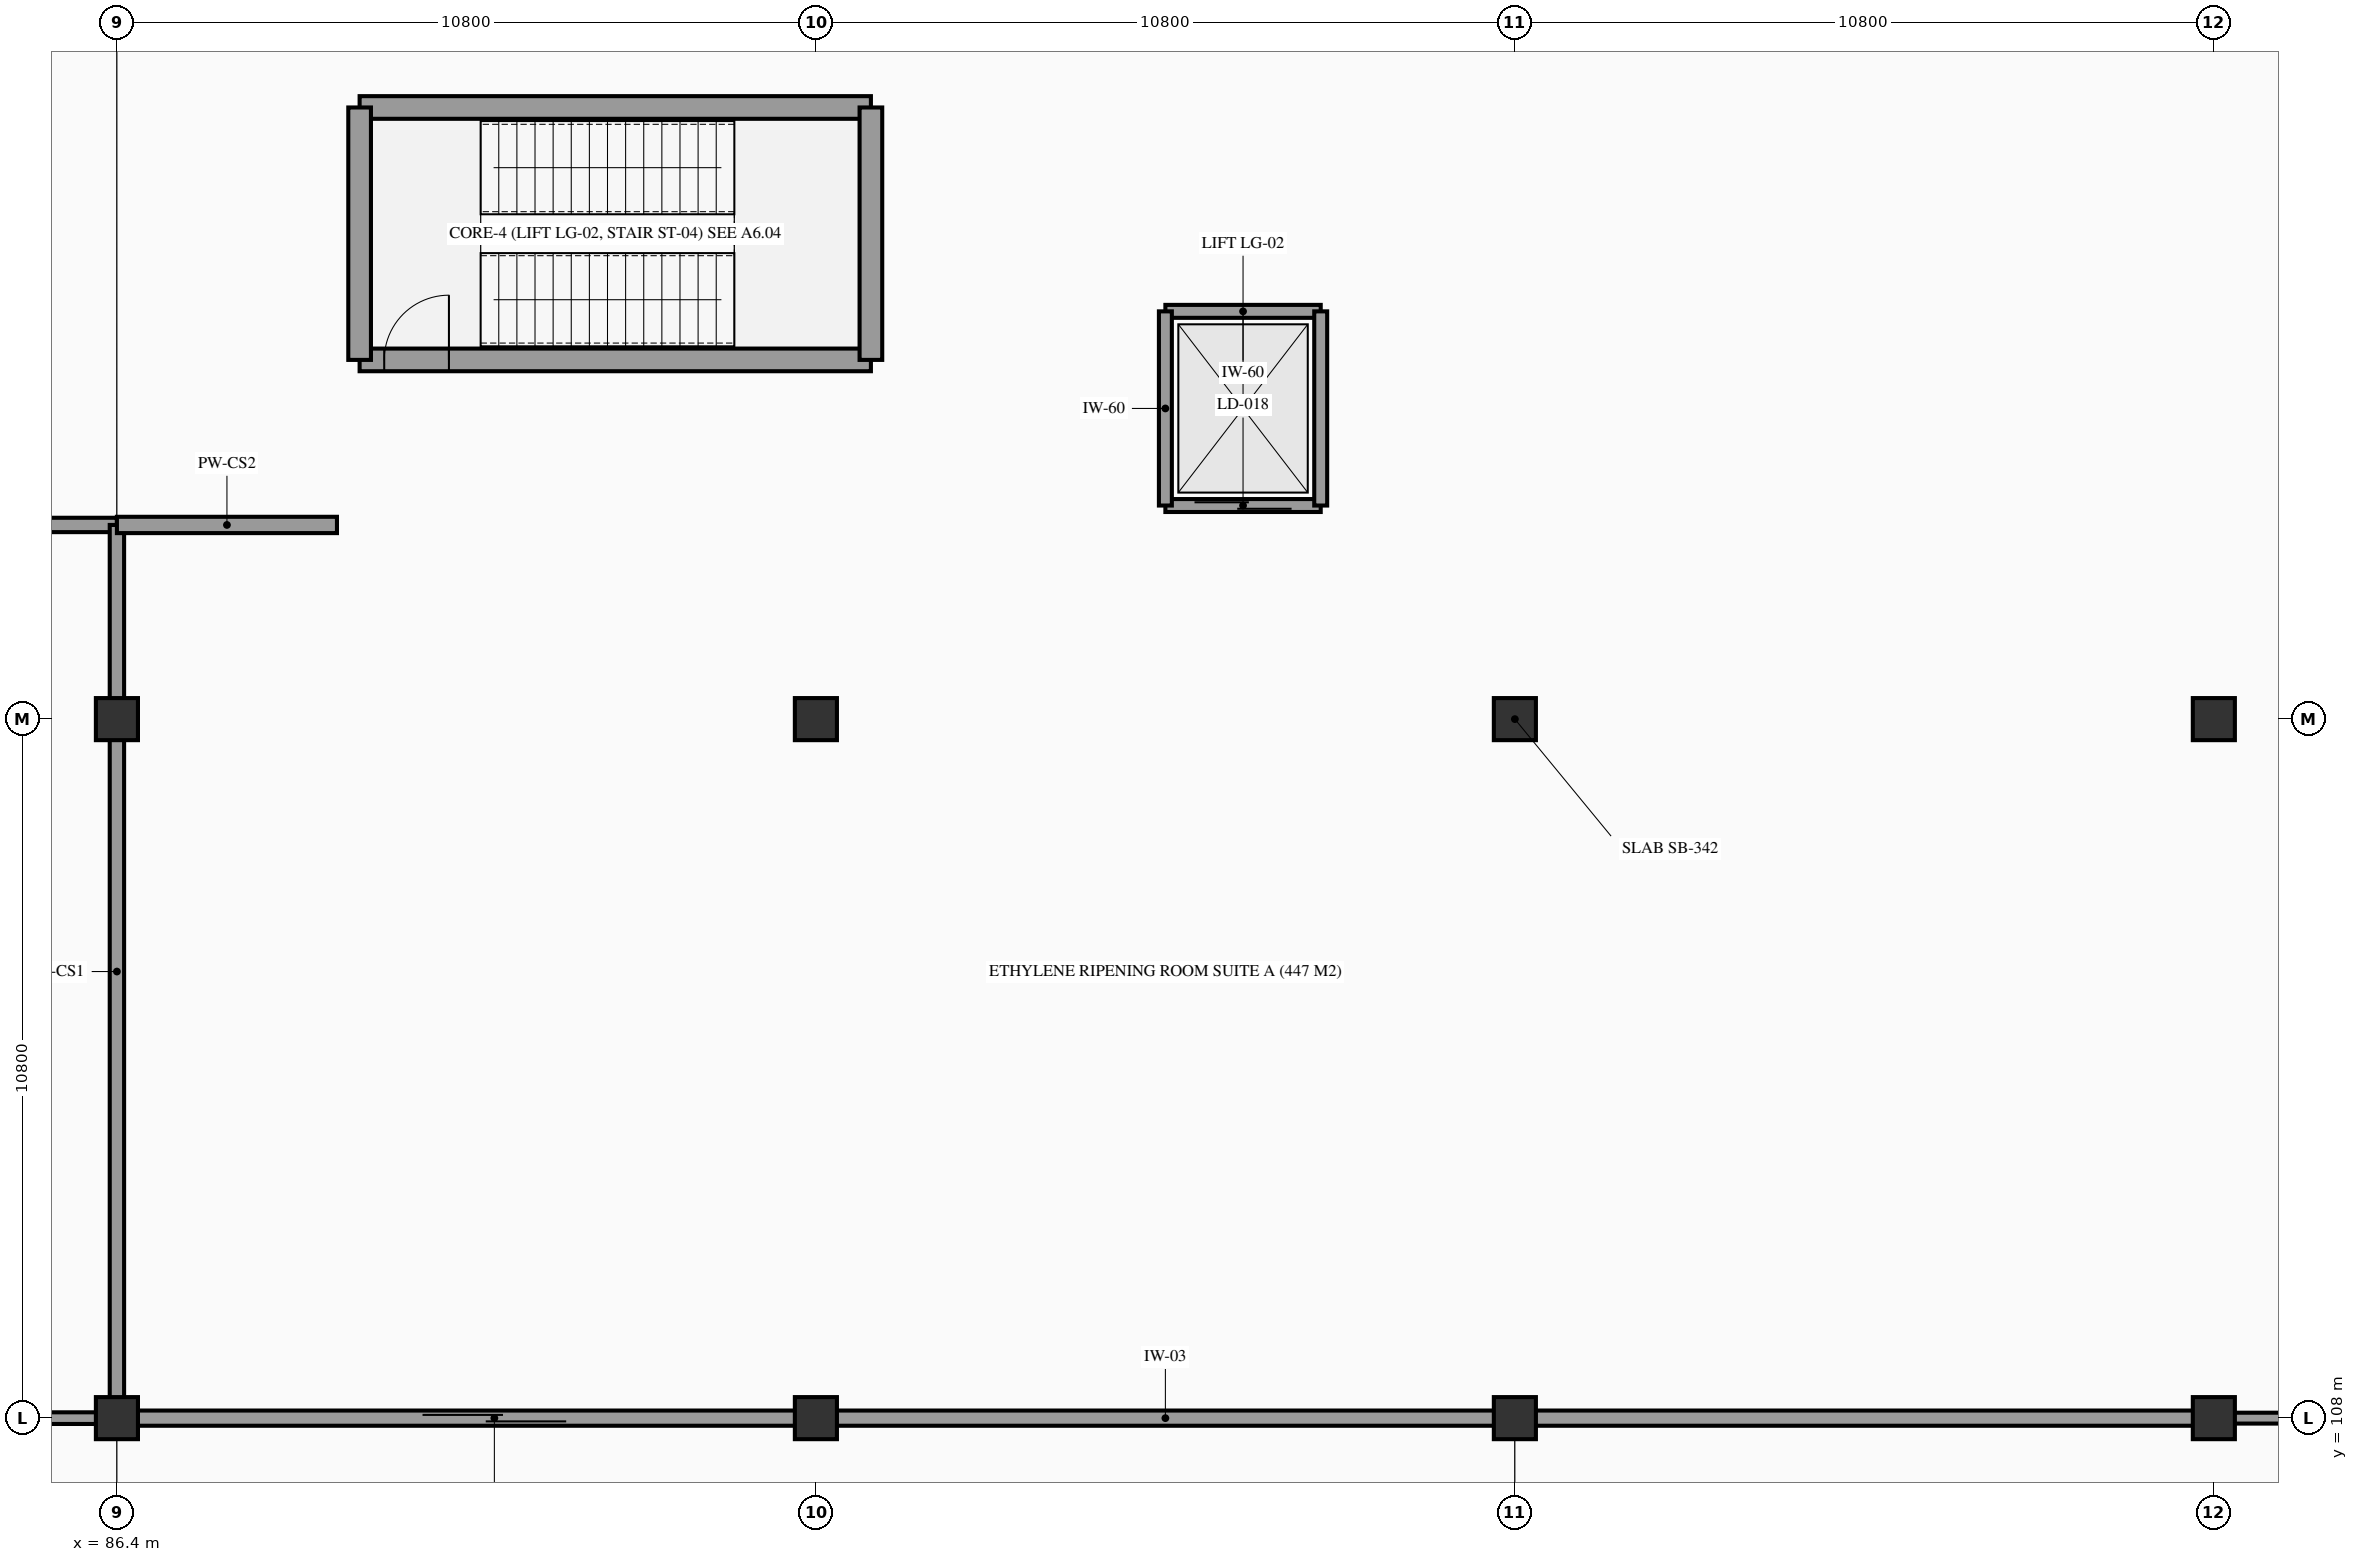
"""IFC4 building model, lengths in metres.
Left out: names, types, materials, properties, quantities, classifications, styles, units other than length and angle.
Written with IfcOpenShell. Run it as: python <this file> out.ifc"""

import sys

from ifc_helpers import new_model, si_unit, direction, frame, frame_2d, origin, origin_2d, place, context, subcontext, project, spatial, rectangle, extrude, element, fill, save


model = new_model("IFC4")
c1 = context("Model", 3, precision=1e-05, world=origin(), true_north=direction((0.0, 1.0)))
c2 = subcontext(c1, "Body", "Model", "MODEL_VIEW")
j1 = project(units=[si_unit("LENGTHUNIT", "METRE"), si_unit("PLANEANGLEUNIT", "RADIAN")], contexts=[c1])
p1 = place(None, origin())
s1 = spatial("IfcSite", under=j1, at=p1, CompositionType="ELEMENT")
p2 = place(p1, origin())
s2 = spatial("IfcBuilding", under=s1, at=p2, CompositionType="ELEMENT")
p3 = place(p2, origin())
s3 = spatial("IfcBuildingStorey", under=s2, at=p3, CompositionType="ELEMENT", Elevation=0.0)
for number, where, z_axis, x_axis in (
    (1, (86.4, 108.0, -1.2), (0.0, 0.0, 1.0), (1.0, 0.0, 0.0)),
    (2, (86.4, 118.8, -1.2), (0.0, 0.0, 1.0), (1.0, 0.0, 0.0)),
    (3, (97.2, 108.0, -1.2), (0.0, 0.0, 1.0), (1.0, 0.0, 0.0)),
    (4, (97.2, 118.8, -1.2), (0.0, 0.0, 1.0), (1.0, 0.0, 0.0)),
    (5, (108.0, 108.0, -1.2), (0.0, 0.0, 1.0), (1.0, 0.0, 0.0)),
    (6, (108.0, 118.8, -1.2), (0.0, 0.0, 1.0), (1.0, 0.0, 0.0)),
    (7, (118.8, 108.0, -1.2), (0.0, 0.0, 1.0), (1.0, 0.0, 0.0)),
    (8, (118.8, 118.8, -1.2), (0.0, 0.0, 1.0), (1.0, 0.0, 0.0)),
):
    element("IfcColumn", number, at=place(p3, frame(where, z_axis=z_axis, x_axis=x_axis)), inside=s3, PredefinedType="COLUMN", context=c2, shape_type="SweptSolid", body=[
        extrude(rectangle(XDim=0.65, YDim=0.65, at=origin_2d()), origin(), (0.0, 0.0, 1.0), 6.6),
    ])
p4 = place(p3, frame((90.15, 124.35, 0.0), z_axis=(0.0, 0.0, 1.0), x_axis=(1.0, 0.0, 0.0)))
e9 = element("IfcWall", 9, at=p4, inside=s3, PredefinedType="SHEAR", context=c2, shape_type="SweptSolid", body=[
    extrude(rectangle(XDim=7.9, YDim=0.35, at=frame_2d((3.95, 0.0))), origin(), (0.0, 0.0, 1.0), 5.4),
])
p5 = place(p4, frame((0.38, 0.0, 0.0)))
e10 = element("IfcOpeningElement", 10, at=p5, cuts=e9, PredefinedType="OPENING", context=c2, shape_type="SweptSolid", body=[
    extrude(rectangle(XDim=1.0, YDim=2.15, at=frame_2d((0.5, 1.075))), frame((0.0, 0.185, 0.0), z_axis=(0.0, -1.0, 0.0), x_axis=(1.0, 0.0, 0.0)), (0.0, 0.0, 1.0), 0.37),
])
p6 = place(p3, frame((90.15, 128.25, 0.0), z_axis=(0.0, 0.0, 1.0), x_axis=(1.0, 0.0, 0.0)))
e11 = element("IfcWall", 11, at=p6, inside=s3, PredefinedType="SHEAR", context=c2, shape_type="SweptSolid", body=[
    extrude(rectangle(XDim=7.9, YDim=0.35, at=frame_2d((3.95, 0.0))), origin(), (0.0, 0.0, 1.0), 5.4),
])
for number, where, z_axis, x_axis in (
    (12, (90.15, 124.35, 0.0), (0.0, 0.0, 1.0), (0.0, 1.0, 0.0)),
    (13, (98.05, 124.35, 0.0), (0.0, 0.0, 1.0), (0.0, 1.0, 0.0)),
):
    element("IfcWall", number, at=place(p3, frame(where, z_axis=z_axis, x_axis=x_axis)), inside=s3, PredefinedType="SHEAR", context=c2, shape_type="SweptSolid", body=[
        extrude(rectangle(XDim=3.9, YDim=0.35, at=frame_2d((1.95, 0.0))), origin(), (0.0, 0.0, 1.0), 5.4),
    ])
p7 = place(p3, frame((102.6, 122.1, 0.0), z_axis=(0.0, 0.0, 1.0), x_axis=(1.0, 0.0, 0.0)))
e14 = element("IfcWall", 14, at=p7, inside=s3, PredefinedType="SOLIDWALL", context=c2, shape_type="SweptSolid", body=[
    extrude(rectangle(XDim=2.4, YDim=0.2, at=frame_2d((1.2, 0.0))), origin(), (0.0, 0.0, 1.0), 4.22),
])
p8 = place(p7, frame((0.45, 0.0, 0.0)))
e15 = element("IfcOpeningElement", 15, at=p8, cuts=e14, PredefinedType="OPENING", context=c2, shape_type="SweptSolid", body=[
    extrude(rectangle(XDim=1.5, YDim=2.3, at=frame_2d((0.75, 1.15))), frame((0.0, 0.11, 0.0), z_axis=(0.0, -1.0, 0.0), x_axis=(1.0, 0.0, 0.0)), (0.0, 0.0, 1.0), 0.22),
])
p9 = place(p3, frame((102.6, 125.1, 0.0), z_axis=(0.0, 0.0, 1.0), x_axis=(1.0, 0.0, 0.0)))
e16 = element("IfcWall", 16, at=p9, inside=s3, PredefinedType="SOLIDWALL", context=c2, shape_type="SweptSolid", body=[
    extrude(rectangle(XDim=2.4, YDim=0.2, at=frame_2d((1.2, 0.0))), origin(), (0.0, 0.0, 1.0), 4.22),
])
for number, where, z_axis, x_axis in (
    (17, (102.6, 122.1, 0.0), (0.0, 0.0, 1.0), (0.0, 1.0, 0.0)),
    (18, (105.0, 122.1, 0.0), (0.0, 0.0, 1.0), (0.0, 1.0, 0.0)),
):
    element("IfcWall", number, at=place(p3, frame(where, z_axis=z_axis, x_axis=x_axis)), inside=s3, PredefinedType="SOLIDWALL", context=c2, shape_type="SweptSolid", body=[
        extrude(rectangle(XDim=3.0, YDim=0.2, at=frame_2d((1.5, 0.0))), origin(), (0.0, 0.0, 1.0), 4.22),
    ])
p10 = place(p3, frame((64.8, 108.0, 0.0), z_axis=(0.0, 0.0, 1.0), x_axis=(1.0, 0.0, 0.0)))
e19 = element("IfcWall", 19, at=p10, inside=s3, PredefinedType="PARTITIONING", context=c2, shape_type="SweptSolid", body=[
    extrude(rectangle(XDim=21.6, YDim=0.18, at=frame_2d((10.8, 0.0))), origin(), (0.0, 0.0, 1.0), 3.95),
])
p11 = place(p10, frame((2.638, 0.0, 0.0)))
e20 = element("IfcOpeningElement", 20, at=p11, cuts=e19, PredefinedType="OPENING", context=c2, shape_type="SweptSolid", body=[
    extrude(rectangle(XDim=2.5, YDim=2.7, at=frame_2d((1.25, 1.35))), frame((0.0, 0.1, 0.0), z_axis=(0.0, -1.0, 0.0), x_axis=(1.0, 0.0, 0.0)), (0.0, 0.0, 1.0), 0.2),
])
p12 = place(p3, frame((86.4, 108.0, 0.0), z_axis=(0.0, 0.0, 1.0), x_axis=(1.0, 0.0, 0.0)))
e21 = element("IfcWall", 21, at=p12, inside=s3, PredefinedType="PARTITIONING", context=c2, shape_type="SweptSolid", body=[
    extrude(rectangle(XDim=32.4, YDim=0.235, at=frame_2d((16.2, 0.0))), origin(), (0.0, 0.0, 1.0), 3.95),
])
p13 = place(p12, frame((4.722, 0.0, 0.0)))
e22 = element("IfcOpeningElement", 22, at=p13, cuts=e21, PredefinedType="OPENING", context=c2, shape_type="SweptSolid", body=[
    extrude(rectangle(XDim=2.22, YDim=2.6, at=frame_2d((1.11, 1.3))), frame((0.0, 0.127, 0.0), z_axis=(0.0, -1.0, 0.0), x_axis=(1.0, 0.0, 0.0)), (0.0, 0.0, 1.0), 0.255),
])
p14 = place(p3, frame((60.15, 121.8, 0.0), z_axis=(0.0, 0.0, 1.0), x_axis=(1.0, 0.0, 0.0)))
e23 = element("IfcWall", 23, at=p14, inside=s3, PredefinedType="PARTITIONING", context=c2, shape_type="SweptSolid", body=[
    extrude(rectangle(XDim=26.25, YDim=0.222, at=frame_2d((13.125, 0.0))), origin(), (0.0, 0.0, 1.0), 3.95),
])
p15 = place(p14, frame((21.99, 0.0, 0.0)))
e24 = element("IfcOpeningElement", 24, at=p15, cuts=e23, PredefinedType="OPENING", context=c2, shape_type="SweptSolid", body=[
    extrude(rectangle(XDim=2.22, YDim=2.6, at=frame_2d((1.11, 1.3))), frame((0.0, 0.121, 0.0), z_axis=(0.0, -1.0, 0.0), x_axis=(1.0, 0.0, 0.0)), (0.0, 0.0, 1.0), 0.242),
])
p16 = place(p3, frame((86.4, 108.0, 0.0), z_axis=(0.0, 0.0, 1.0), x_axis=(0.0, 1.0, 0.0)))
e25 = element("IfcWall", 25, at=p16, inside=s3, PredefinedType="PARTITIONING", context=c2, shape_type="SweptSolid", body=[
    extrude(rectangle(XDim=13.8, YDim=0.222, at=frame_2d((6.9, 0.0))), origin(), (0.0, 0.0, 1.0), 3.95),
])
p17 = place(p3, frame((86.4, 121.8, 0.0), z_axis=(0.0, 0.0, 1.0), x_axis=(1.0, 0.0, 0.0)))
e26 = element("IfcWall", 26, at=p17, inside=s3, PredefinedType="PARTITIONING", context=c2, shape_type="SweptSolid", body=[
    extrude(rectangle(XDim=3.4, YDim=0.252, at=frame_2d((1.7, 0.0))), origin(), (0.0, 0.0, 1.0), 3.95),
])
p18 = place(p3, frame((118.8, 108.0, 0.0), z_axis=(0.0, 0.0, 1.0), x_axis=(1.0, 0.0, 0.0)))
e27 = element("IfcWall", 27, at=p18, inside=s3, PredefinedType="PARTITIONING", context=c2, shape_type="SweptSolid", body=[
    extrude(rectangle(XDim=8.8, YDim=0.168, at=frame_2d((4.4, 0.0))), origin(), (0.0, 0.0, 1.0), 3.95),
])
p19 = place(p5, origin())
e28 = element("IfcDoor", 28, at=p19, inside=s3, OperationType="SINGLE_SWING_RIGHT", PredefinedType="DOOR", context=c2, shape_type="SweptSolid", body=[
    extrude(rectangle(XDim=1.0, YDim=2.15, at=frame_2d((0.5, 1.075))), frame((0.0, 0.025, 0.0), z_axis=(0.0, -1.0, 0.0), x_axis=(1.0, 0.0, 0.0)), (0.0, 0.0, 1.0), 0.05),
])
fill(e10, e28)
p20 = place(p8, origin())
e29 = element("IfcDoor", 29, at=p20, inside=s3, OperationType="DOUBLE_DOOR_SLIDING", PredefinedType="DOOR", context=c2, shape_type="SweptSolid", body=[
    extrude(rectangle(XDim=1.5, YDim=2.3, at=frame_2d((0.75, 1.15))), frame((0.0, 0.025, 0.0), z_axis=(0.0, -1.0, 0.0), x_axis=(1.0, 0.0, 0.0)), (0.0, 0.0, 1.0), 0.05),
])
fill(e15, e29)
p21 = place(p13, origin())
e30 = element("IfcDoor", 30, at=p21, inside=s3, OperationType="SLIDING_TO_RIGHT", PredefinedType="DOOR", context=c2, shape_type="SweptSolid", body=[
    extrude(rectangle(XDim=2.22, YDim=2.6, at=frame_2d((1.11, 1.3))), frame((0.0, 0.025, 0.0), z_axis=(0.0, -1.0, 0.0), x_axis=(1.0, 0.0, 0.0)), (0.0, 0.0, 1.0), 0.05),
])
fill(e22, e30)
save(model, sys.argv[1])
